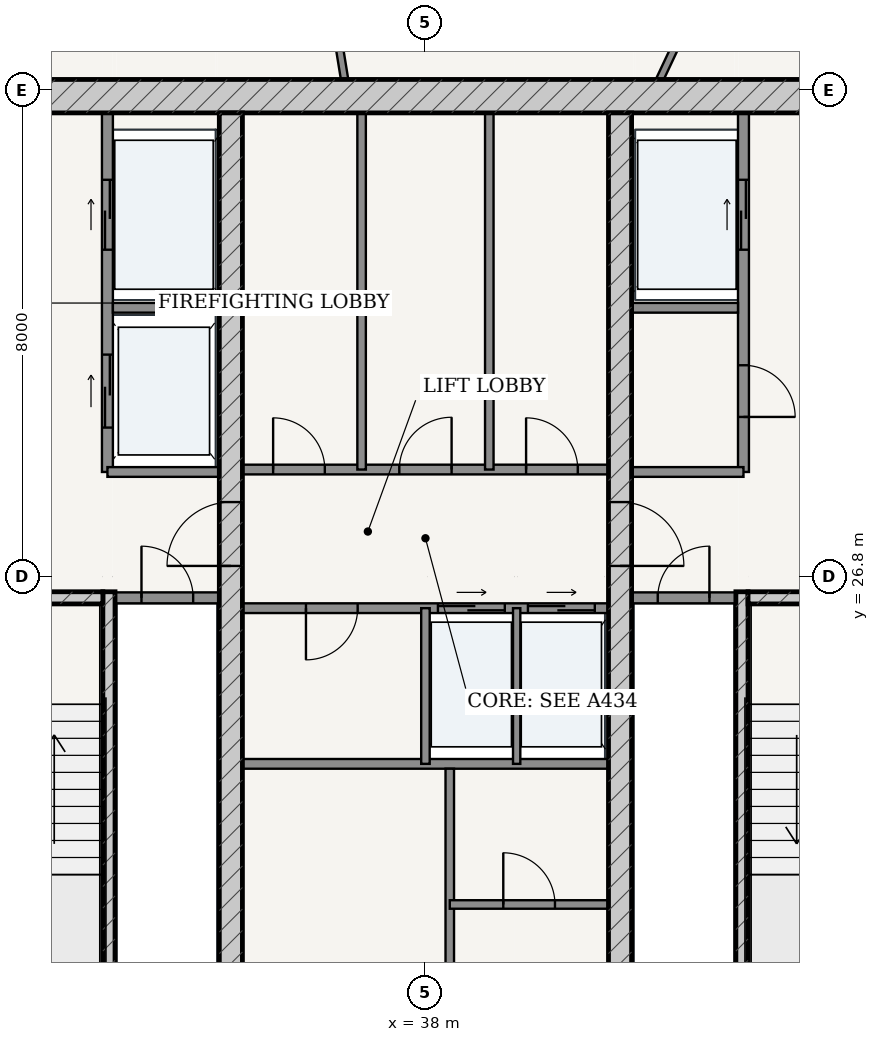
"""IFC4 building model, lengths in metres.
Left out: names, types, materials, properties, quantities, classifications, styles, units other than length and angle.
Written with IfcOpenShell. Run it as: python <this file> out.ifc"""

import sys

from ifc_helpers import new_model, si_unit, direction, frame, frame_2d, origin, place, context, subcontext, project, spatial, rectangle, extrude, source, transform, mapped, element, fill, save


model = new_model("IFC4")
c1 = context("Model", 3, precision=1e-05, world=origin(), true_north=direction((-0.2419218956, 0.970295726276)))
c2 = subcontext(c1, "Body", "Model", "MODEL_VIEW")
j1 = project(units=[si_unit("LENGTHUNIT", "METRE"), si_unit("PLANEANGLEUNIT", "RADIAN")], contexts=[c1])
p1 = place(None, origin())
s1 = spatial("IfcSite", under=j1, at=p1, CompositionType="ELEMENT")
p2 = place(p1, origin())
s2 = spatial("IfcBuilding", under=s1, at=p2, CompositionType="ELEMENT")
p3 = place(p2, frame((0.0, 0.0, 255.7)))
s3 = spatial("IfcBuildingStorey", under=s2, at=p3, CompositionType="ELEMENT", Elevation=255.7)
p4 = place(p3, frame((28.825, 34.7, 0.0), z_axis=(0.0, 0.0, 1.0), x_axis=(1.0, 0.0, 0.0)))
e1 = element("IfcWall", 1, at=p4, inside=s3, PredefinedType="SHEAR", context=c2, shape_type="SweptSolid", body=[
    extrude(rectangle(XDim=18.35, YDim=0.55, at=frame_2d((9.175, 0.0))), origin(), (0.0, 0.0, 1.0), 3.49),
])
p5 = place(p3, frame((32.795, 19.175, 0.0), z_axis=(0.0, 0.0, 1.0), x_axis=(0.0, 1.0, 0.0)))
e2 = element("IfcWall", 2, at=p5, inside=s3, PredefinedType="SOLIDWALL", context=c2, shape_type="SweptSolid", body=[
    extrude(rectangle(XDim=7.375, YDim=0.2, at=frame_2d((3.688, 0.0))), origin(), (0.0, 0.0, 1.0), 3.49),
])
p6 = place(p3, frame((29.375, 26.45, 0.0), z_axis=(0.0, 0.0, 1.0), x_axis=(1.0, 0.0, 0.0)))
e3 = element("IfcWall", 3, at=p6, inside=s3, PredefinedType="SOLIDWALL", context=c2, shape_type="SweptSolid", body=[
    extrude(rectangle(XDim=3.32, YDim=0.2, at=frame_2d((1.66, 0.0))), origin(), (0.0, 0.0, 1.0), 3.49),
])
p7 = place(p6, frame((1.185, 0.0, 0.0)))
e4 = element("IfcOpeningElement", 4, at=p7, cuts=e3, PredefinedType="OPENING", context=c2, shape_type="SweptSolid", body=[
    extrude(rectangle(XDim=0.95, YDim=2.15, at=frame_2d((0.475, 1.075))), frame((0.0, 0.11, 0.0), z_axis=(0.0, -1.0, 0.0), x_axis=(1.0, 0.0, 0.0)), (0.0, 0.0, 1.0), 0.22),
])
p8 = place(p3, frame((43.205, 19.175, 0.0), z_axis=(0.0, 0.0, 1.0), x_axis=(0.0, 1.0, 0.0)))
e5 = element("IfcWall", 5, at=p8, inside=s3, PredefinedType="SOLIDWALL", context=c2, shape_type="SweptSolid", body=[
    extrude(rectangle(XDim=7.375, YDim=0.2, at=frame_2d((3.688, 0.0))), origin(), (0.0, 0.0, 1.0), 3.49),
])
p9 = place(p3, frame((43.305, 26.45, 0.0), z_axis=(0.0, 0.0, 1.0), x_axis=(1.0, 0.0, 0.0)))
e6 = element("IfcWall", 6, at=p9, inside=s3, PredefinedType="SOLIDWALL", context=c2, shape_type="SweptSolid", body=[
    extrude(rectangle(XDim=3.32, YDim=0.2, at=frame_2d((1.66, 0.0))), origin(), (0.0, 0.0, 1.0), 3.49),
])
p10 = place(p9, frame((1.185, 0.0, 0.0)))
e7 = element("IfcOpeningElement", 7, at=p10, cuts=e6, PredefinedType="OPENING", context=c2, shape_type="SweptSolid", body=[
    extrude(rectangle(XDim=0.95, YDim=2.15, at=frame_2d((0.475, 1.075))), frame((0.0, 0.11, 0.0), z_axis=(0.0, -1.0, 0.0), x_axis=(1.0, 0.0, 0.0)), (0.0, 0.0, 1.0), 0.22),
])
p11 = place(p3, frame((34.8, 19.175, 0.0), z_axis=(0.0, 0.0, 1.0), x_axis=(0.0, 1.0, 0.0)))
e8 = element("IfcWall", 8, at=p11, inside=s3, PredefinedType="SHEAR", context=c2, shape_type="SweptSolid", body=[
    extrude(rectangle(XDim=15.25, YDim=0.38, at=frame_2d((7.625, 0.0))), origin(), (0.0, 0.0, 1.0), 3.49),
])
p12 = place(p11, frame((7.8, 0.0, 0.0)))
e9 = element("IfcOpeningElement", 9, at=p12, cuts=e8, PredefinedType="OPENING", context=c2, shape_type="SweptSolid", body=[
    extrude(rectangle(XDim=1.05, YDim=2.15, at=frame_2d((0.525, 1.075))), frame((0.0, 0.2, 0.0), z_axis=(0.0, -1.0, 0.0), x_axis=(1.0, 0.0, 0.0)), (0.0, 0.0, 1.0), 0.4),
])
p13 = place(p3, frame((41.2, 19.175, 0.0), z_axis=(0.0, 0.0, 1.0), x_axis=(0.0, 1.0, 0.0)))
e10 = element("IfcWall", 10, at=p13, inside=s3, PredefinedType="SHEAR", context=c2, shape_type="SweptSolid", body=[
    extrude(rectangle(XDim=15.25, YDim=0.38, at=frame_2d((7.625, 0.0))), origin(), (0.0, 0.0, 1.0), 3.49),
])
p14 = place(p13, frame((7.8, 0.0, 0.0)))
e11 = element("IfcOpeningElement", 11, at=p14, cuts=e10, PredefinedType="OPENING", context=c2, shape_type="SweptSolid", body=[
    extrude(rectangle(XDim=1.05, YDim=2.15, at=frame_2d((0.525, 1.075))), frame((0.0, 0.2, 0.0), z_axis=(0.0, -1.0, 0.0), x_axis=(1.0, 0.0, 0.0)), (0.0, 0.0, 1.0), 0.4),
])
p15 = place(p3, frame((32.9, 26.45, 0.0), z_axis=(0.0, 0.0, 1.0), x_axis=(1.0, 0.0, 0.0)))
e12 = element("IfcWall", 12, at=p15, inside=s3, PredefinedType="PARTITIONING", context=c2, shape_type="SweptSolid", body=[
    extrude(rectangle(XDim=1.71, YDim=0.18, at=frame_2d((0.855, 0.0))), origin(), (0.0, 0.0, 1.0), 3.49),
])
p16 = place(p15, frame((0.43, 0.0, 0.0)))
e13 = element("IfcOpeningElement", 13, at=p16, cuts=e12, PredefinedType="OPENING", context=c2, shape_type="SweptSolid", body=[
    extrude(rectangle(XDim=0.85, YDim=2.1, at=frame_2d((0.425, 1.05))), frame((0.0, 0.1, 0.0), z_axis=(0.0, -1.0, 0.0), x_axis=(1.0, 0.0, 0.0)), (0.0, 0.0, 1.0), 0.2),
])
p17 = place(p3, frame((41.39, 26.45, 0.0), z_axis=(0.0, 0.0, 1.0), x_axis=(1.0, 0.0, 0.0)))
e14 = element("IfcWall", 14, at=p17, inside=s3, PredefinedType="PARTITIONING", context=c2, shape_type="SweptSolid", body=[
    extrude(rectangle(XDim=1.71, YDim=0.18, at=frame_2d((0.855, 0.0))), origin(), (0.0, 0.0, 1.0), 3.49),
])
p18 = place(p17, frame((0.43, 0.0, 0.0)))
e15 = element("IfcOpeningElement", 15, at=p18, cuts=e14, PredefinedType="OPENING", context=c2, shape_type="SweptSolid", body=[
    extrude(rectangle(XDim=0.85, YDim=2.1, at=frame_2d((0.425, 1.05))), frame((0.0, 0.1, 0.0), z_axis=(0.0, -1.0, 0.0), x_axis=(1.0, 0.0, 0.0)), (0.0, 0.0, 1.0), 0.2),
])
p19 = place(p3, frame((32.77, 28.52, 0.0), z_axis=(0.0, 0.0, 1.0), x_axis=(0.0, 1.0, 0.0)))
e16 = element("IfcWall", 16, at=p19, inside=s3, PredefinedType="PARTITIONING", context=c2, shape_type="SweptSolid", body=[
    extrude(rectangle(XDim=5.905, YDim=0.18, at=frame_2d((2.953, 0.0))), origin(), (0.0, 0.0, 1.0), 3.49),
])
p20 = place(p19, frame((3.655, 0.0, 0.0)))
e17 = element("IfcOpeningElement", 17, at=p20, cuts=e16, PredefinedType="OPENING", context=c2, shape_type="SweptSolid", body=[
    extrude(rectangle(XDim=1.15, YDim=2.2, at=frame_2d((0.575, 1.1))), frame((0.0, 0.1, 0.0), z_axis=(0.0, -1.0, 0.0), x_axis=(1.0, 0.0, 0.0)), (0.0, 0.0, 1.0), 0.2),
])
p21 = place(p19, frame((0.73, 0.0, 0.0)))
e18 = element("IfcOpeningElement", 18, at=p21, cuts=e16, PredefinedType="OPENING", context=c2, shape_type="SweptSolid", body=[
    extrude(rectangle(XDim=1.2, YDim=2.25, at=frame_2d((0.6, 1.125))), frame((0.0, 0.1, 0.0), z_axis=(0.0, -1.0, 0.0), x_axis=(1.0, 0.0, 0.0)), (0.0, 0.0, 1.0), 0.2),
])
p22 = place(p3, frame((32.86, 31.22, 0.0), z_axis=(0.0, 0.0, 1.0), x_axis=(1.0, 0.0, 0.0)))
e19 = element("IfcWall", 19, at=p22, inside=s3, PredefinedType="PARTITIONING", context=c2, shape_type="SweptSolid", body=[
    extrude(rectangle(XDim=1.75, YDim=0.16, at=frame_2d((0.875, 0.0))), origin(), (0.0, 0.0, 1.0), 3.49),
])
p23 = place(p3, frame((32.77, 28.52, 0.0), z_axis=(0.0, 0.0, 1.0), x_axis=(1.0, 0.0, 0.0)))
e20 = element("IfcWall", 20, at=p23, inside=s3, PredefinedType="PARTITIONING", context=c2, shape_type="SweptSolid", body=[
    extrude(rectangle(XDim=1.84, YDim=0.16, at=frame_2d((0.92, 0.0))), origin(), (0.0, 0.0, 1.0), 3.49),
])
p24 = place(p3, frame((43.23, 28.52, 0.0), z_axis=(0.0, 0.0, 1.0), x_axis=(0.0, 1.0, 0.0)))
e21 = element("IfcWall", 21, at=p24, inside=s3, PredefinedType="PARTITIONING", context=c2, shape_type="SweptSolid", body=[
    extrude(rectangle(XDim=5.905, YDim=0.18, at=frame_2d((2.953, 0.0))), origin(), (0.0, 0.0, 1.0), 3.49),
])
p25 = place(p24, frame((0.905, 0.0, 0.0)))
e22 = element("IfcOpeningElement", 22, at=p25, cuts=e21, PredefinedType="OPENING", context=c2, shape_type="SweptSolid", body=[
    extrude(rectangle(XDim=0.85, YDim=2.1, at=frame_2d((0.425, 1.05))), frame((0.0, 0.1, 0.0), z_axis=(0.0, -1.0, 0.0), x_axis=(1.0, 0.0, 0.0)), (0.0, 0.0, 1.0), 0.2),
])
p26 = place(p24, frame((3.655, 0.0, 0.0)))
e23 = element("IfcOpeningElement", 23, at=p26, cuts=e21, PredefinedType="OPENING", context=c2, shape_type="SweptSolid", body=[
    extrude(rectangle(XDim=1.15, YDim=2.2, at=frame_2d((0.575, 1.1))), frame((0.0, 0.1, 0.0), z_axis=(0.0, -1.0, 0.0), x_axis=(1.0, 0.0, 0.0)), (0.0, 0.0, 1.0), 0.2),
])
p27 = place(p3, frame((41.39, 31.22, 0.0), z_axis=(0.0, 0.0, 1.0), x_axis=(1.0, 0.0, 0.0)))
e24 = element("IfcWall", 24, at=p27, inside=s3, PredefinedType="PARTITIONING", context=c2, shape_type="SweptSolid", body=[
    extrude(rectangle(XDim=1.75, YDim=0.16, at=frame_2d((0.875, 0.0))), origin(), (0.0, 0.0, 1.0), 3.49),
])
p28 = place(p3, frame((41.39, 28.52, 0.0), z_axis=(0.0, 0.0, 1.0), x_axis=(1.0, 0.0, 0.0)))
e25 = element("IfcWall", 25, at=p28, inside=s3, PredefinedType="PARTITIONING", context=c2, shape_type="SweptSolid", body=[
    extrude(rectangle(XDim=1.84, YDim=0.16, at=frame_2d((0.92, 0.0))), origin(), (0.0, 0.0, 1.0), 3.49),
])
p29 = place(p3, frame((34.99, 28.56, 0.0), z_axis=(0.0, 0.0, 1.0), x_axis=(1.0, 0.0, 0.0)))
e26 = element("IfcWall", 26, at=p29, inside=s3, PredefinedType="PARTITIONING", context=c2, shape_type="SweptSolid", body=[
    extrude(rectangle(XDim=6.02, YDim=0.16, at=frame_2d((3.01, 0.0))), origin(), (0.0, 0.0, 1.0), 3.49),
])
p30 = place(p29, frame((0.505, 0.0, 0.0)))
e27 = element("IfcOpeningElement", 27, at=p30, cuts=e26, PredefinedType="OPENING", context=c2, shape_type="SweptSolid", body=[
    extrude(rectangle(XDim=0.85, YDim=2.1, at=frame_2d((0.425, 1.05))), frame((0.0, 0.09, 0.0), z_axis=(0.0, -1.0, 0.0), x_axis=(1.0, 0.0, 0.0)), (0.0, 0.0, 1.0), 0.18),
])
p31 = place(p29, frame((2.58, 0.0, 0.0)))
e28 = element("IfcOpeningElement", 28, at=p31, cuts=e26, PredefinedType="OPENING", context=c2, shape_type="SweptSolid", body=[
    extrude(rectangle(XDim=0.86, YDim=2.1, at=frame_2d((0.43, 1.05))), frame((0.0, 0.09, 0.0), z_axis=(0.0, -1.0, 0.0), x_axis=(1.0, 0.0, 0.0)), (0.0, 0.0, 1.0), 0.18),
])
p32 = place(p29, frame((4.665, 0.0, 0.0)))
e29 = element("IfcOpeningElement", 29, at=p32, cuts=e26, PredefinedType="OPENING", context=c2, shape_type="SweptSolid", body=[
    extrude(rectangle(XDim=0.85, YDim=2.1, at=frame_2d((0.425, 1.05))), frame((0.0, 0.09, 0.0), z_axis=(0.0, -1.0, 0.0), x_axis=(1.0, 0.0, 0.0)), (0.0, 0.0, 1.0), 0.18),
])
for number, where, z_axis, x_axis in (
    (30, (36.95, 28.56, 0.0), (0.0, 0.0, 1.0), (0.0, 1.0, 0.0)),
    (31, (39.05, 28.56, 0.0), (0.0, 0.0, 1.0), (0.0, 1.0, 0.0)),
):
    element("IfcWall", number, at=place(p3, frame(where, z_axis=z_axis, x_axis=x_axis)), inside=s3, PredefinedType="PARTITIONING", context=c2, shape_type="SweptSolid", body=[
        extrude(rectangle(XDim=5.865, YDim=0.14, at=frame_2d((2.933, 0.0))), origin(), (0.0, 0.0, 1.0), 3.49),
    ])
p33 = place(p3, frame((34.99, 26.28, 0.0), z_axis=(0.0, 0.0, 1.0), x_axis=(1.0, 0.0, 0.0)))
e32 = element("IfcWall", 32, at=p33, inside=s3, PredefinedType="PARTITIONING", context=c2, shape_type="SweptSolid", body=[
    extrude(rectangle(XDim=6.02, YDim=0.16, at=frame_2d((3.01, 0.0))), origin(), (0.0, 0.0, 1.0), 3.49),
])
p34 = place(p33, frame((1.045, 0.0, 0.0)))
e33 = element("IfcOpeningElement", 33, at=p34, cuts=e32, PredefinedType="OPENING", context=c2, shape_type="SweptSolid", body=[
    extrude(rectangle(XDim=0.85, YDim=2.1, at=frame_2d((0.425, 1.05))), frame((0.0, 0.09, 0.0), z_axis=(0.0, -1.0, 0.0), x_axis=(1.0, 0.0, 0.0)), (0.0, 0.0, 1.0), 0.18),
])
p35 = place(p33, frame((3.215, 0.0, 0.0)))
e34 = element("IfcOpeningElement", 34, at=p35, cuts=e32, PredefinedType="OPENING", context=c2, shape_type="SweptSolid", body=[
    extrude(rectangle(XDim=1.1, YDim=2.2, at=frame_2d((0.55, 1.1))), frame((0.0, 0.09, 0.0), z_axis=(0.0, -1.0, 0.0), x_axis=(1.0, 0.0, 0.0)), (0.0, 0.0, 1.0), 0.18),
])
p36 = place(p33, frame((4.695, 0.0, 0.0)))
e35 = element("IfcOpeningElement", 35, at=p36, cuts=e32, PredefinedType="OPENING", context=c2, shape_type="SweptSolid", body=[
    extrude(rectangle(XDim=1.1, YDim=2.2, at=frame_2d((0.55, 1.1))), frame((0.0, 0.09, 0.0), z_axis=(0.0, -1.0, 0.0), x_axis=(1.0, 0.0, 0.0)), (0.0, 0.0, 1.0), 0.18),
])
p37 = place(p3, frame((34.99, 23.72, 0.0), z_axis=(0.0, 0.0, 1.0), x_axis=(1.0, 0.0, 0.0)))
e36 = element("IfcWall", 36, at=p37, inside=s3, PredefinedType="PARTITIONING", context=c2, shape_type="SweptSolid", body=[
    extrude(rectangle(XDim=6.02, YDim=0.16, at=frame_2d((3.01, 0.0))), origin(), (0.0, 0.0, 1.0), 3.49),
])
p38 = place(p3, frame((38.0, 23.72, 0.0), z_axis=(0.0, 0.0, 1.0), x_axis=(0.0, 1.0, 0.0)))
e37 = element("IfcWall", 37, at=p38, inside=s3, PredefinedType="PARTITIONING", context=c2, shape_type="SweptSolid", body=[
    extrude(rectangle(XDim=2.56, YDim=0.14, at=frame_2d((1.28, 0.0))), origin(), (0.0, 0.0, 1.0), 3.49),
])
p39 = place(p3, frame((39.5, 23.72, 0.0), z_axis=(0.0, 0.0, 1.0), x_axis=(0.0, 1.0, 0.0)))
e38 = element("IfcWall", 38, at=p39, inside=s3, PredefinedType="PARTITIONING", context=c2, shape_type="SweptSolid", body=[
    extrude(rectangle(XDim=2.56, YDim=0.12, at=frame_2d((1.28, 0.0))), origin(), (0.0, 0.0, 1.0), 3.49),
])
p40 = place(p3, frame((38.4, 19.175, 0.0), z_axis=(0.0, 0.0, 1.0), x_axis=(0.0, 1.0, 0.0)))
e39 = element("IfcWall", 39, at=p40, inside=s3, PredefinedType="PARTITIONING", context=c2, shape_type="SweptSolid", body=[
    extrude(rectangle(XDim=4.465, YDim=0.14, at=frame_2d((2.232, 0.0))), origin(), (0.0, 0.0, 1.0), 3.49),
])
p41 = place(p3, frame((38.4, 21.407, 0.0), z_axis=(0.0, 0.0, 1.0), x_axis=(1.0, 0.0, 0.0)))
e40 = element("IfcWall", 40, at=p41, inside=s3, PredefinedType="PARTITIONING", context=c2, shape_type="SweptSolid", body=[
    extrude(rectangle(XDim=2.61, YDim=0.14, at=frame_2d((1.305, 0.0))), origin(), (0.0, 0.0, 1.0), 3.49),
])
p42 = place(p41, frame((0.88, 0.0, 0.0)))
e41 = element("IfcOpeningElement", 41, at=p42, cuts=e40, PredefinedType="OPENING", context=c2, shape_type="SweptSolid", body=[
    extrude(rectangle(XDim=0.85, YDim=2.1, at=frame_2d((0.425, 1.05))), frame((0.0, 0.08, 0.0), z_axis=(0.0, -1.0, 0.0), x_axis=(1.0, 0.0, 0.0)), (0.0, 0.0, 1.0), 0.16),
])
p43 = place(p3, frame((41.854, 34.977, 0.0), z_axis=(0.0, 0.0, 1.0), x_axis=(0.42640827804, 0.904530806783, 0.0)))
e42 = element("IfcWall", 42, at=p43, inside=s3, PredefinedType="PARTITIONING", context=c2, shape_type="SweptSolid", body=[
    extrude(rectangle(XDim=2.866, YDim=0.12, at=frame_2d((1.433, 0.0))), origin(), (0.0, 0.0, 1.0), 3.49),
])
p44 = place(p43, frame((0.983, 0.0, 0.0)))
e43 = element("IfcOpeningElement", 43, at=p44, cuts=e42, PredefinedType="OPENING", context=c2, shape_type="SweptSolid", body=[
    extrude(rectangle(XDim=0.9, YDim=2.15, at=frame_2d((0.45, 1.075))), frame((0.0, 0.07, 0.0), z_axis=(0.0, -1.0, 0.0), x_axis=(1.0, 0.0, 0.0)), (0.0, 0.0, 1.0), 0.14),
])
p45 = place(p3, frame((36.67, 34.977, 0.0), z_axis=(0.0, 0.0, 1.0), x_axis=(-0.160605953374, 0.98701860557, 0.0)))
e44 = element("IfcWall", 44, at=p45, inside=s3, PredefinedType="PARTITIONING", context=c2, shape_type="SweptSolid", body=[
    extrude(rectangle(XDim=2.621, YDim=0.12, at=frame_2d((1.31, 0.0))), origin(), (0.0, 0.0, 1.0), 2.575),
])
p46 = place(p45, frame((0.86, 0.0, 0.0)))
e45 = element("IfcOpeningElement", 45, at=p46, cuts=e44, PredefinedType="OPENING", context=c2, shape_type="SweptSolid", body=[
    extrude(rectangle(XDim=0.9, YDim=2.15, at=frame_2d((0.45, 1.075))), frame((0.0, 0.07, 0.0), z_axis=(0.0, -1.0, 0.0), x_axis=(1.0, 0.0, 0.0)), (0.0, 0.0, 1.0), 0.14),
])
m1 = source(origin(), c2, "Body", "SweptSolid", [
    extrude(rectangle(XDim=1.05, YDim=2.15, at=frame_2d((0.525, 1.075))), frame((0.0, 0.025, 0.0), z_axis=(0.0, -1.0, 0.0), x_axis=(1.0, 0.0, 0.0)), (0.0, 0.0, 1.0), 0.05),
])
p47 = place(p12, origin())
e46 = element("IfcDoor", 46, at=p47, inside=s3, OperationType="SINGLE_SWING_LEFT", PredefinedType="DOOR", context=c2, shape_type="MappedRepresentation", body=[
    mapped(m1, transform((0.0, 0.0, 0.0), scale=1.0)),
])
fill(e9, e46)
p48 = place(p14, frame((1.05, 0.0, 0.0), z_axis=(0.0, 0.0, 1.0), x_axis=(-1.0, 0.0, 0.0)))
e47 = element("IfcDoor", 47, at=p48, inside=s3, OperationType="SINGLE_SWING_RIGHT", PredefinedType="DOOR", context=c2, shape_type="MappedRepresentation", body=[
    mapped(m1, transform((0.0, 0.0, 0.0), scale=1.0)),
])
fill(e11, e47)
m2 = source(origin(), c2, "Body", "SweptSolid", [
    extrude(rectangle(XDim=0.85, YDim=2.1, at=frame_2d((0.425, 1.05))), frame((0.0, 0.025, 0.0), z_axis=(0.0, -1.0, 0.0), x_axis=(1.0, 0.0, 0.0)), (0.0, 0.0, 1.0), 0.05),
])
p49 = place(p16, origin())
e48 = element("IfcDoor", 48, at=p49, inside=s3, OperationType="SINGLE_SWING_LEFT", PredefinedType="DOOR", context=c2, shape_type="MappedRepresentation", body=[
    mapped(m2, transform((0.0, 0.0, 0.0), scale=1.0)),
])
fill(e13, e48)
p50 = place(p18, origin())
e49 = element("IfcDoor", 49, at=p50, inside=s3, OperationType="SINGLE_SWING_RIGHT", PredefinedType="DOOR", context=c2, shape_type="MappedRepresentation", body=[
    mapped(m2, transform((0.0, 0.0, 0.0), scale=1.0)),
])
fill(e15, e49)
p51 = place(p25, frame((0.85, 0.0, 0.0), z_axis=(0.0, 0.0, 1.0), x_axis=(-1.0, 0.0, 0.0)))
e50 = element("IfcDoor", 50, at=p51, inside=s3, OperationType="SINGLE_SWING_RIGHT", PredefinedType="DOOR", context=c2, shape_type="MappedRepresentation", body=[
    mapped(m2, transform((0.0, 0.0, 0.0), scale=1.0)),
])
fill(e22, e50)
p52 = place(p30, origin())
e51 = element("IfcDoor", 51, at=p52, inside=s3, OperationType="SINGLE_SWING_LEFT", PredefinedType="DOOR", context=c2, shape_type="MappedRepresentation", body=[
    mapped(m2, transform((0.0, 0.0, 0.0), scale=1.0)),
])
fill(e27, e51)
m3 = source(origin(), c2, "Body", "SweptSolid", [
    extrude(rectangle(XDim=0.86, YDim=2.1, at=frame_2d((0.43, 1.05))), frame((0.0, 0.025, 0.0), z_axis=(0.0, -1.0, 0.0), x_axis=(1.0, 0.0, 0.0)), (0.0, 0.0, 1.0), 0.05),
])
p53 = place(p31, origin())
e52 = element("IfcDoor", 52, at=p53, inside=s3, OperationType="SINGLE_SWING_RIGHT", PredefinedType="DOOR", context=c2, shape_type="MappedRepresentation", body=[
    mapped(m3, transform((0.0, 0.0, 0.0), scale=1.0)),
])
fill(e28, e52)
p54 = place(p32, origin())
e53 = element("IfcDoor", 53, at=p54, inside=s3, OperationType="SINGLE_SWING_LEFT", PredefinedType="DOOR", context=c2, shape_type="MappedRepresentation", body=[
    mapped(m2, transform((0.0, 0.0, 0.0), scale=1.0)),
])
fill(e29, e53)
p55 = place(p34, frame((0.85, 0.0, 0.0), z_axis=(0.0, 0.0, 1.0), x_axis=(-1.0, 0.0, 0.0)))
e54 = element("IfcDoor", 54, at=p55, inside=s3, OperationType="SINGLE_SWING_RIGHT", PredefinedType="DOOR", context=c2, shape_type="MappedRepresentation", body=[
    mapped(m2, transform((0.0, 0.0, 0.0), scale=1.0)),
])
fill(e33, e54)
p56 = place(p42, origin())
e55 = element("IfcDoor", 55, at=p56, inside=s3, OperationType="SINGLE_SWING_LEFT", PredefinedType="DOOR", context=c2, shape_type="MappedRepresentation", body=[
    mapped(m2, transform((0.0, 0.0, 0.0), scale=1.0)),
])
fill(e41, e55)
m4 = source(origin(), c2, "Body", "SweptSolid", [
    extrude(rectangle(XDim=1.15, YDim=2.2, at=frame_2d((0.575, 1.1))), frame((0.0, 0.025, 0.0), z_axis=(0.0, -1.0, 0.0), x_axis=(1.0, 0.0, 0.0)), (0.0, 0.0, 1.0), 0.05),
])
p57 = place(p20, origin())
e56 = element("IfcDoor", 56, at=p57, inside=s3, OperationType="DOUBLE_DOOR_SLIDING", PredefinedType="DOOR", context=c2, shape_type="MappedRepresentation", body=[
    mapped(m4, transform((0.0, 0.0, 0.0), scale=1.0)),
])
fill(e17, e56)
p58 = place(p26, origin())
e57 = element("IfcDoor", 57, at=p58, inside=s3, OperationType="DOUBLE_DOOR_SLIDING", PredefinedType="DOOR", context=c2, shape_type="MappedRepresentation", body=[
    mapped(m4, transform((0.0, 0.0, 0.0), scale=1.0)),
])
fill(e23, e57)
m5 = source(origin(), c2, "Body", "SweptSolid", [
    extrude(rectangle(XDim=1.2, YDim=2.25, at=frame_2d((0.6, 1.125))), frame((0.0, 0.025, 0.0), z_axis=(0.0, -1.0, 0.0), x_axis=(1.0, 0.0, 0.0)), (0.0, 0.0, 1.0), 0.05),
])
p59 = place(p21, origin())
e58 = element("IfcDoor", 58, at=p59, inside=s3, OperationType="DOUBLE_DOOR_SLIDING", PredefinedType="DOOR", context=c2, shape_type="MappedRepresentation", body=[
    mapped(m5, transform((0.0, 0.0, 0.0), scale=1.0)),
])
fill(e18, e58)
m6 = source(origin(), c2, "Body", "SweptSolid", [
    extrude(rectangle(XDim=1.1, YDim=2.2, at=frame_2d((0.55, 1.1))), frame((0.0, 0.025, 0.0), z_axis=(0.0, -1.0, 0.0), x_axis=(1.0, 0.0, 0.0)), (0.0, 0.0, 1.0), 0.05),
])
p60 = place(p35, origin())
e59 = element("IfcDoor", 59, at=p60, inside=s3, OperationType="DOUBLE_DOOR_SLIDING", PredefinedType="DOOR", context=c2, shape_type="MappedRepresentation", body=[
    mapped(m6, transform((0.0, 0.0, 0.0), scale=1.0)),
])
fill(e34, e59)
p61 = place(p36, origin())
e60 = element("IfcDoor", 60, at=p61, inside=s3, OperationType="DOUBLE_DOOR_SLIDING", PredefinedType="DOOR", context=c2, shape_type="MappedRepresentation", body=[
    mapped(m6, transform((0.0, 0.0, 0.0), scale=1.0)),
])
fill(e35, e60)
save(model, sys.argv[1])
